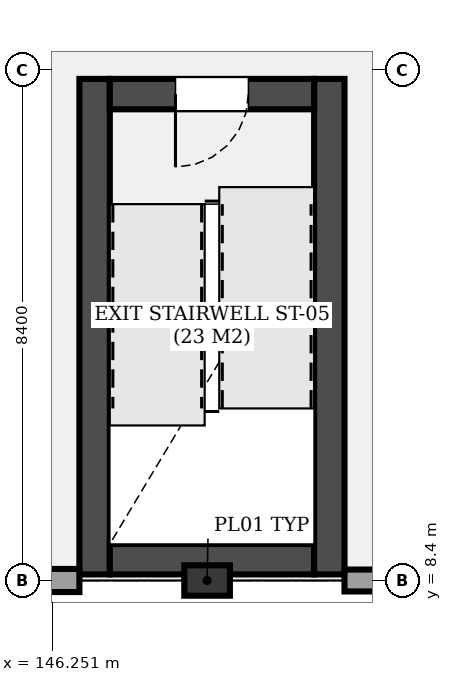
"""IFC4 building model, lengths in metres.
Left out: names, types, materials, properties, quantities, classifications, styles, units other than length and angle.
Written with IfcOpenShell. Run it as: python <this file> out.ifc"""

import sys

from ifc_helpers import new_model, si_unit, direction, frame, frame_2d, origin, origin_2d, place, context, subcontext, project, spatial, rectangle, extrude, element, fill, save


model = new_model("IFC4")
c1 = context("Model", 3, precision=1e-05, world=origin(), true_north=direction((0.0, 1.0)))
c2 = subcontext(c1, "Body", "Model", "MODEL_VIEW")
j1 = project(units=[si_unit("LENGTHUNIT", "METRE"), si_unit("PLANEANGLEUNIT", "RADIAN")], contexts=[c1])
p1 = place(None, origin())
s1 = spatial("IfcSite", under=j1, at=p1, CompositionType="ELEMENT")
p2 = place(p1, origin())
s2 = spatial("IfcBuilding", under=s1, at=p2, CompositionType="ELEMENT")
p3 = place(p2, frame((0.0, 0.0, 5.1)))
s3 = spatial("IfcBuildingStorey", under=s2, at=p3, CompositionType="ELEMENT", Elevation=5.1)
p4 = place(p3, frame((148.8, 8.4, 0.0), z_axis=(0.0, 0.0, 1.0), x_axis=(1.0, 0.0, 0.0)))
e1 = element("IfcColumn", 1, at=p4, inside=s3, PredefinedType="PILASTER", context=c2, shape_type="SweptSolid", body=[
    extrude(rectangle(XDim=0.75, YDim=0.5, at=origin_2d()), origin(), (0.0, 0.0, 1.0), 4.8),
])
p5 = place(p3, frame((146.95, 16.65, 0.0), z_axis=(0.0, 0.0, 1.0), x_axis=(0.0, -1.0, 0.0)))
e2 = element("IfcWall", 2, at=p5, inside=s3, PredefinedType="SHEAR", context=c2, shape_type="SweptSolid", body=[
    extrude(rectangle(XDim=8.15, YDim=0.5, at=frame_2d((4.075, 0.0))), origin(), (0.0, 0.0, 1.0), 4.8),
])
p6 = place(p3, frame((147.2, 8.75, 0.0), z_axis=(0.0, 0.0, 1.0), x_axis=(1.0, 0.0, 0.0)))
e3 = element("IfcWall", 3, at=p6, inside=s3, PredefinedType="SHEAR", context=c2, shape_type="SweptSolid", body=[
    extrude(rectangle(XDim=3.36, YDim=0.5, at=frame_2d((1.68, 0.0))), origin(), (0.0, 0.0, 1.0), 4.8),
])
p7 = place(p3, frame((150.81, 8.5, 0.0), z_axis=(0.0, 0.0, 1.0), x_axis=(0.0, 1.0, 0.0)))
e4 = element("IfcWall", 4, at=p7, inside=s3, PredefinedType="SHEAR", context=c2, shape_type="SweptSolid", body=[
    extrude(rectangle(XDim=8.15, YDim=0.5, at=frame_2d((4.075, 0.0))), origin(), (0.0, 0.0, 1.0), 4.8),
])
p8 = place(p3, frame((150.56, 16.4, 0.0), z_axis=(0.0, 0.0, 1.0), x_axis=(-1.0, 0.0, 0.0)))
e5 = element("IfcWall", 5, at=p8, inside=s3, PredefinedType="SHEAR", context=c2, shape_type="SweptSolid", body=[
    extrude(rectangle(XDim=3.36, YDim=0.5, at=frame_2d((1.68, 0.0))), origin(), (0.0, 0.0, 1.0), 4.8),
])
p9 = place(p8, frame((1.08, 0.0, 0.0)))
e6 = element("IfcOpeningElement", 6, at=p9, cuts=e5, PredefinedType="OPENING", context=c2, shape_type="SweptSolid", body=[
    extrude(rectangle(XDim=1.2, YDim=2.2, at=frame_2d((0.6, 1.1))), frame((0.0, 0.26, 0.0), z_axis=(0.0, -1.0, 0.0), x_axis=(1.0, 0.0, 0.0)), (0.0, 0.0, 1.0), 0.52),
])
p10 = place(p3, frame((153.6, 8.4, 0.0), z_axis=(0.0, 0.0, 1.0), x_axis=(-1.0, 0.0, 0.0)))
e7 = element("IfcWall", 7, at=p10, inside=s3, PredefinedType="SOLIDWALL", context=c2, shape_type="SweptSolid", body=[
    extrude(rectangle(XDim=2.54, YDim=0.36, at=frame_2d((1.27, 0.0))), origin(), (0.0, 0.0, 1.0), 3.94),
])
p11 = place(p3, frame((146.7, 8.4, 0.0), z_axis=(0.0, 0.0, 1.0), x_axis=(-1.0, 0.0, 0.0)))
e8 = element("IfcWall", 8, at=p11, inside=s3, PredefinedType="SOLIDWALL", context=c2, shape_type="SweptSolid", body=[
    extrude(rectangle(XDim=2.7, YDim=0.38, at=frame_2d((1.35, 0.0))), origin(), (0.0, 0.0, 1.0), 3.94),
])
p12 = place(p9, origin())
e9 = element("IfcDoor", 9, at=p12, inside=s3, OperationType="SINGLE_SWING_RIGHT", PredefinedType="DOOR", context=c2, shape_type="SweptSolid", body=[
    extrude(rectangle(XDim=1.2, YDim=2.2, at=frame_2d((0.6, 1.1))), frame((0.0, 0.025, 0.0), z_axis=(0.0, -1.0, 0.0), x_axis=(1.0, 0.0, 0.0)), (0.0, 0.0, 1.0), 0.05),
])
fill(e6, e9)
save(model, sys.argv[1])
